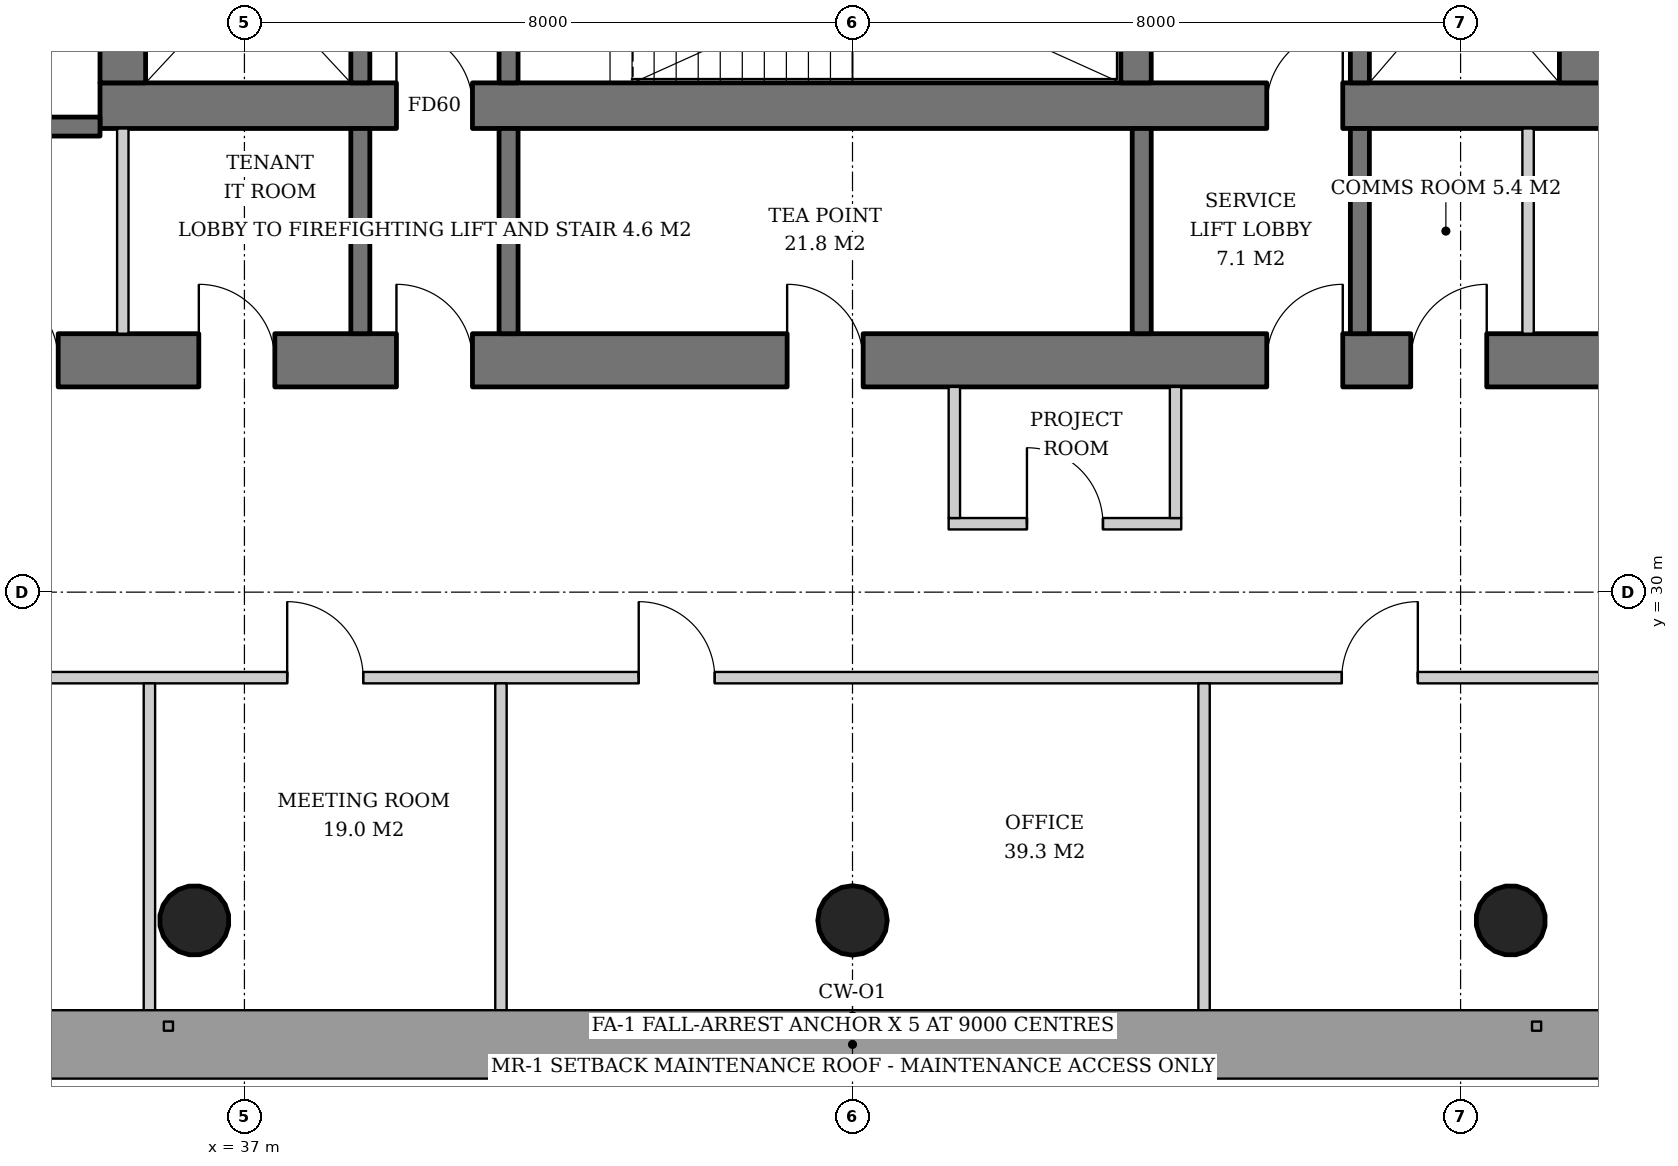
"""IFC4 building model, lengths in metres.
Left out: names, types, materials, properties, quantities, classifications, styles, units other than length and angle.
Written with IfcOpenShell. Run it as: python <this file> out.ifc"""

import sys

from ifc_helpers import new_model, si_unit, direction, frame, frame_2d, origin, origin_2d, place, context, subcontext, project, spatial, rectangle, hollow_circle, extrude, element, fill, save


model = new_model("IFC4")
c1 = context("Model", 3, precision=1e-05, world=origin(), true_north=direction((0.0, 1.0)))
c2 = subcontext(c1, "Body", "Model", "MODEL_VIEW")
j1 = project(units=[si_unit("LENGTHUNIT", "METRE"), si_unit("PLANEANGLEUNIT", "RADIAN")], contexts=[c1])
p1 = place(None, origin())
s1 = spatial("IfcSite", under=j1, at=p1, CompositionType="ELEMENT")
p2 = place(p1, origin())
s2 = spatial("IfcBuilding", under=s1, at=p2, CompositionType="ELEMENT")
p3 = place(p2, frame((0.0, 0.0, 135.0)))
s3 = spatial("IfcBuildingStorey", under=s2, at=p3, CompositionType="ELEMENT", Elevation=135.0)
p4 = place(p3, frame((36.322, 25.643, 0.0), z_axis=(0.015923015547, 0.031974442509, 0.999361842679), x_axis=(-0.895145027055, 0.445775033553, 0.0)))
e1 = element("IfcColumn", 1, at=p4, inside=s3, PredefinedType="COLUMN", context=c2, shape_type="SweptSolid", body=[
    extrude(hollow_circle(Radius=0.457, WallThickness=0.03, at=origin_2d()), origin(), (0.0, 0.0, 1.0), 3.802),
])
p5 = place(p3, frame((45.0, 25.643, 0.0), z_axis=(0.0, 0.031978496719, 0.999488557087), x_axis=(-1.0, 0.0, 0.0)))
e2 = element("IfcColumn", 2, at=p5, inside=s3, PredefinedType="COLUMN", context=c2, shape_type="SweptSolid", body=[
    extrude(hollow_circle(Radius=0.457, WallThickness=0.03, at=origin_2d()), origin(), (0.0, 0.0, 1.0), 3.802),
])
p6 = place(p3, frame((53.678, 25.643, 0.0), z_axis=(-0.015923015547, 0.031974442509, 0.999361842679), x_axis=(-0.895145027055, -0.445775033553, 0.0)))
e3 = element("IfcColumn", 3, at=p6, inside=s3, PredefinedType="COLUMN", context=c2, shape_type="SweptSolid", body=[
    extrude(hollow_circle(Radius=0.457, WallThickness=0.03, at=origin_2d()), origin(), (0.0, 0.0, 1.0), 3.802),
])
p7 = place(p3, frame((35.1, 36.4, 0.0), z_axis=(0.0, 0.0, 1.0), x_axis=(1.0, 0.0, 0.0)))
e4 = element("IfcWall", 4, at=p7, inside=s3, PredefinedType="SHEAR", context=c2, shape_type="SweptSolid", body=[
    extrude(rectangle(XDim=19.8, YDim=0.6, at=frame_2d((9.9, 0.0))), origin(), (0.0, 0.0, 1.0), 3.8),
])
p8 = place(p7, frame((3.9, 0.0, 0.0)))
e5 = element("IfcOpeningElement", 5, at=p8, cuts=e4, PredefinedType="OPENING", context=c2, shape_type="SweptSolid", body=[
    extrude(rectangle(XDim=1.0, YDim=2.1, at=frame_2d((0.5, 1.05))), frame((0.0, 0.31, 0.0), z_axis=(0.0, -1.0, 0.0), x_axis=(1.0, 0.0, 0.0)), (0.0, 0.0, 1.0), 0.62),
])
p9 = place(p7, frame((15.35, 0.0, 0.0)))
e6 = element("IfcOpeningElement", 6, at=p9, cuts=e4, PredefinedType="OPENING", context=c2, shape_type="SweptSolid", body=[
    extrude(rectangle(XDim=1.0, YDim=2.1, at=frame_2d((0.5, 1.05))), frame((0.0, 0.31, 0.0), z_axis=(0.0, -1.0, 0.0), x_axis=(1.0, 0.0, 0.0)), (0.0, 0.0, 1.0), 0.62),
])
p10 = place(p3, frame((35.4, 36.7, 0.0), z_axis=(0.0, 0.0, 1.0), x_axis=(0.0, 1.0, 0.0)))
e7 = element("IfcWall", 7, at=p10, inside=s3, PredefinedType="SHEAR", context=c2, shape_type="SweptSolid", body=[
    extrude(rectangle(XDim=18.6, YDim=0.6, at=frame_2d((9.3, 0.0))), origin(), (0.0, 0.0, 1.0), 3.8),
])
p11 = place(p10, frame((8.4, 0.0, 0.0)))
e8 = element("IfcOpeningElement", 8, at=p11, cuts=e7, PredefinedType="OPENING", context=c2, shape_type="SweptSolid", body=[
    extrude(rectangle(XDim=1.8, YDim=2.4, at=frame_2d((0.9, 1.2))), frame((0.0, 0.31, 0.0), z_axis=(0.0, -1.0, 0.0), x_axis=(1.0, 0.0, 0.0)), (0.0, 0.0, 1.0), 0.62),
])
p12 = place(p3, frame((54.6, 36.7, 0.0), z_axis=(0.0, 0.0, 1.0), x_axis=(0.0, 1.0, 0.0)))
e9 = element("IfcWall", 9, at=p12, inside=s3, PredefinedType="SHEAR", context=c2, shape_type="SweptSolid", body=[
    extrude(rectangle(XDim=18.6, YDim=0.6, at=frame_2d((9.3, 0.0))), origin(), (0.0, 0.0, 1.0), 3.8),
])
p13 = place(p12, frame((8.4, 0.0, 0.0)))
e10 = element("IfcOpeningElement", 10, at=p13, cuts=e9, PredefinedType="OPENING", context=c2, shape_type="SweptSolid", body=[
    extrude(rectangle(XDim=1.8, YDim=2.4, at=frame_2d((0.9, 1.2))), frame((0.0, 0.31, 0.0), z_axis=(0.0, -1.0, 0.0), x_axis=(1.0, 0.0, 0.0)), (0.0, 0.0, 1.0), 0.62),
])
p14 = place(p3, frame((31.7, 33.05, 0.0), z_axis=(0.0, 0.0, 1.0), x_axis=(1.0, 0.0, 0.0)))
e11 = element("IfcWall", 11, at=p14, inside=s3, PredefinedType="SHEAR", context=c2, shape_type="SweptSolid", body=[
    extrude(rectangle(XDim=26.6, YDim=0.7, at=frame_2d((13.3, 0.0))), origin(), (0.0, 0.0, 1.0), 3.8),
])
p15 = place(p14, frame((7.3, 0.0, 0.0)))
e12 = element("IfcOpeningElement", 12, at=p15, cuts=e11, PredefinedType="OPENING", context=c2, shape_type="SweptSolid", body=[
    extrude(rectangle(XDim=1.0, YDim=2.1, at=frame_2d((0.5, 1.05))), frame((0.0, 0.36, 0.0), z_axis=(0.0, -1.0, 0.0), x_axis=(1.0, 0.0, 0.0)), (0.0, 0.0, 1.0), 0.72),
])
p16 = place(p14, frame((18.75, 0.0, 0.0)))
e13 = element("IfcOpeningElement", 13, at=p16, cuts=e11, PredefinedType="OPENING", context=c2, shape_type="SweptSolid", body=[
    extrude(rectangle(XDim=1.0, YDim=2.1, at=frame_2d((0.5, 1.05))), frame((0.0, 0.36, 0.0), z_axis=(0.0, -1.0, 0.0), x_axis=(1.0, 0.0, 0.0)), (0.0, 0.0, 1.0), 0.72),
])
p17 = place(p14, frame((1.85, 0.0, 0.0)))
e14 = element("IfcOpeningElement", 14, at=p17, cuts=e11, PredefinedType="OPENING", context=c2, shape_type="SweptSolid", body=[
    extrude(rectangle(XDim=1.0, YDim=2.1, at=frame_2d((0.5, 1.05))), frame((0.0, 0.36, 0.0), z_axis=(0.0, -1.0, 0.0), x_axis=(1.0, 0.0, 0.0)), (0.0, 0.0, 1.0), 0.72),
])
p18 = place(p14, frame((4.7, 0.0, 0.0)))
e15 = element("IfcOpeningElement", 15, at=p18, cuts=e11, PredefinedType="OPENING", context=c2, shape_type="SweptSolid", body=[
    extrude(rectangle(XDim=1.0, YDim=2.1, at=frame_2d((0.5, 1.05))), frame((0.0, 0.36, 0.0), z_axis=(0.0, -1.0, 0.0), x_axis=(1.0, 0.0, 0.0)), (0.0, 0.0, 1.0), 0.72),
])
p19 = place(p14, frame((12.44, 0.0, 0.0)))
e16 = element("IfcOpeningElement", 16, at=p19, cuts=e11, PredefinedType="OPENING", context=c2, shape_type="SweptSolid", body=[
    extrude(rectangle(XDim=1.0, YDim=2.1, at=frame_2d((0.5, 1.05))), frame((0.0, 0.36, 0.0), z_axis=(0.0, -1.0, 0.0), x_axis=(1.0, 0.0, 0.0)), (0.0, 0.0, 1.0), 0.72),
])
p20 = place(p14, frame((20.644, 0.0, 0.0)))
e17 = element("IfcOpeningElement", 17, at=p20, cuts=e11, PredefinedType="OPENING", context=c2, shape_type="SweptSolid", body=[
    extrude(rectangle(XDim=1.0, YDim=2.1, at=frame_2d((0.5, 1.05))), frame((0.0, 0.36, 0.0), z_axis=(0.0, -1.0, 0.0), x_axis=(1.0, 0.0, 0.0)), (0.0, 0.0, 1.0), 0.72),
])
p21 = place(p14, frame((23.544, 0.0, 0.0)))
e18 = element("IfcOpeningElement", 18, at=p21, cuts=e11, PredefinedType="OPENING", context=c2, shape_type="SweptSolid", body=[
    extrude(rectangle(XDim=1.0, YDim=2.1, at=frame_2d((0.5, 1.05))), frame((0.0, 0.36, 0.0), z_axis=(0.0, -1.0, 0.0), x_axis=(1.0, 0.0, 0.0)), (0.0, 0.0, 1.0), 0.72),
])
p22 = place(p3, frame((48.73, 36.7, 0.0), z_axis=(0.0, 0.0, 1.0), x_axis=(0.0, 1.0, 0.0)))
e19 = element("IfcWall", 19, at=p22, inside=s3, PredefinedType="SHEAR", context=c2, shape_type="SweptSolid", body=[
    extrude(rectangle(XDim=2.9, YDim=0.4, at=frame_2d((1.45, 0.0))), origin(), (0.0, 0.0, 1.0), 3.8),
])
p23 = place(p3, frame((38.525, 36.7, 0.0), z_axis=(0.0, 0.0, 1.0), x_axis=(0.0, 1.0, 0.0)))
e20 = element("IfcWall", 20, at=p23, inside=s3, PredefinedType="SHEAR", context=c2, shape_type="SweptSolid", body=[
    extrude(rectangle(XDim=2.9, YDim=0.25, at=frame_2d((1.45, 0.0))), origin(), (0.0, 0.0, 1.0), 3.8),
])
p24 = place(p23, frame((0.8, 0.0, 0.0)))
e21 = element("IfcOpeningElement", 21, at=p24, cuts=e20, PredefinedType="OPENING", context=c2, shape_type="SweptSolid", body=[
    extrude(rectangle(XDim=1.3, YDim=2.2, at=frame_2d((0.65, 1.1))), frame((0.0, 0.135, 0.0), z_axis=(0.0, -1.0, 0.0), x_axis=(1.0, 0.0, 0.0)), (0.0, 0.0, 1.0), 0.27),
])
p25 = place(p3, frame((40.475, 36.7, 0.0), z_axis=(0.0, 0.0, 1.0), x_axis=(0.0, 1.0, 0.0)))
e22 = element("IfcWall", 22, at=p25, inside=s3, PredefinedType="SHEAR", context=c2, shape_type="SweptSolid", body=[
    extrude(rectangle(XDim=2.9, YDim=0.25, at=frame_2d((1.45, 0.0))), origin(), (0.0, 0.0, 1.0), 3.8),
])
p26 = place(p25, frame((0.75, 0.0, 0.0)))
e23 = element("IfcOpeningElement", 23, at=p26, cuts=e22, PredefinedType="OPENING", context=c2, shape_type="SweptSolid", body=[
    extrude(rectangle(XDim=1.2, YDim=2.1, at=frame_2d((0.6, 1.05))), frame((0.0, 0.135, 0.0), z_axis=(0.0, -1.0, 0.0), x_axis=(1.0, 0.0, 0.0)), (0.0, 0.0, 1.0), 0.27),
])
p27 = place(p3, frame((51.675, 36.7, 0.0), z_axis=(0.0, 0.0, 1.0), x_axis=(0.0, 1.0, 0.0)))
e24 = element("IfcWall", 24, at=p27, inside=s3, PredefinedType="SHEAR", context=c2, shape_type="SweptSolid", body=[
    extrude(rectangle(XDim=2.9, YDim=0.25, at=frame_2d((1.45, 0.0))), origin(), (0.0, 0.0, 1.0), 3.8),
])
p28 = place(p27, frame((0.75, 0.0, 0.0)))
e25 = element("IfcOpeningElement", 25, at=p28, cuts=e24, PredefinedType="OPENING", context=c2, shape_type="SweptSolid", body=[
    extrude(rectangle(XDim=1.4, YDim=2.4, at=frame_2d((0.7, 1.2))), frame((0.0, 0.135, 0.0), z_axis=(0.0, -1.0, 0.0), x_axis=(1.0, 0.0, 0.0)), (0.0, 0.0, 1.0), 0.27),
])
p29 = place(p3, frame((32.4, 36.125, 0.0), z_axis=(0.0, 0.0, 1.0), x_axis=(1.0, 0.0, 0.0)))
e26 = element("IfcWall", 26, at=p29, inside=s3, PredefinedType="SHEAR", context=c2, shape_type="SweptSolid", body=[
    extrude(rectangle(XDim=2.7, YDim=0.25, at=frame_2d((1.35, 0.0))), origin(), (0.0, 0.0, 1.0), 3.8),
])
for number, where, z_axis, x_axis in (
    (27, (38.525, 33.4, 0.0), (0.0, 0.0, 1.0), (0.0, 1.0, 0.0)),
    (28, (40.475, 33.4, 0.0), (0.0, 0.0, 1.0), (0.0, 1.0, 0.0)),
    (29, (48.805, 33.4, 0.0), (0.0, 0.0, 1.0), (0.0, 1.0, 0.0)),
    (30, (51.675, 33.4, 0.0), (0.0, 0.0, 1.0), (0.0, 1.0, 0.0)),
):
    element("IfcWall", number, at=place(p3, frame(where, z_axis=z_axis, x_axis=x_axis)), inside=s3, PredefinedType="SOLIDWALL", context=c2, shape_type="SweptSolid", body=[
        extrude(rectangle(XDim=2.7, YDim=0.25, at=frame_2d((1.35, 0.0))), origin(), (0.0, 0.0, 1.0), 3.62),
    ])
for number, where, z_axis, x_axis in (
    (31, (35.4, 33.4, 0.0), (0.0, 0.0, 1.0), (0.0, 1.0, 0.0)),
    (32, (53.888, 33.4, 0.0), (0.0, 0.0, 1.0), (0.0, 1.0, 0.0)),
):
    element("IfcWall", number, at=place(p3, frame(where, z_axis=z_axis, x_axis=x_axis)), inside=s3, PredefinedType="SOLIDWALL", context=c2, shape_type="SweptSolid", body=[
        extrude(rectangle(XDim=2.7, YDim=0.15, at=frame_2d((1.35, 0.0))), origin(), (0.0, 0.0, 1.0), 3.62),
    ])
p30 = place(p3, frame((46.265, 30.9, 0.0), z_axis=(0.0, 0.0, 1.0), x_axis=(1.0, 0.0, 0.0)))
e33 = element("IfcWall", 33, at=p30, inside=s3, PredefinedType="PARTITIONING", context=c2, shape_type="SweptSolid", body=[
    extrude(rectangle(XDim=3.06, YDim=0.15, at=frame_2d((1.53, 0.0))), origin(), (0.0, 0.0, 1.0), 2.858),
])
p31 = place(p30, frame((1.03, 0.0, 0.0)))
e34 = element("IfcOpeningElement", 34, at=p31, cuts=e33, PredefinedType="OPENING", context=c2, shape_type="SweptSolid", body=[
    extrude(rectangle(XDim=1.0, YDim=2.1, at=frame_2d((0.5, 1.05))), frame((0.0, 0.085, 0.0), z_axis=(0.0, -1.0, 0.0), x_axis=(1.0, 0.0, 0.0)), (0.0, 0.0, 1.0), 0.17),
])
for number, where, z_axis, x_axis in (
    (35, (46.34, 32.7, 0.0), (0.0, 0.0, 1.0), (0.0, -1.0, 0.0)),
    (36, (49.25, 32.7, 0.0), (0.0, 0.0, 1.0), (0.0, -1.0, 0.0)),
):
    element("IfcWall", number, at=place(p3, frame(where, z_axis=z_axis, x_axis=x_axis)), inside=s3, PredefinedType="PARTITIONING", context=c2, shape_type="SweptSolid", body=[
        extrude(rectangle(XDim=1.725, YDim=0.15, at=frame_2d((0.862, 0.0))), origin(), (0.0, 0.0, 1.0), 3.62),
    ])
p32 = place(p3, frame((29.789, 28.875, 0.0), z_axis=(0.0, 0.0, 1.0), x_axis=(1.0, 0.0, 0.0)))
e37 = element("IfcWall", 37, at=p32, inside=s3, PredefinedType="PARTITIONING", context=c2, shape_type="SweptSolid", body=[
    extrude(rectangle(XDim=30.423, YDim=0.15, at=frame_2d((15.211, 0.0))), origin(), (0.0, 0.0, 1.0), 2.72),
])
p33 = place(p32, frame((3.149, 0.0, 0.0)))
e38 = element("IfcOpeningElement", 38, at=p33, cuts=e37, PredefinedType="OPENING", context=c2, shape_type="SweptSolid", body=[
    extrude(rectangle(XDim=1.0, YDim=2.1, at=frame_2d((0.5, 1.05))), frame((0.0, 0.085, 0.0), z_axis=(0.0, -1.0, 0.0), x_axis=(1.0, 0.0, 0.0)), (0.0, 0.0, 1.0), 0.17),
])
p34 = place(p32, frame((7.774, 0.0, 0.0)))
e39 = element("IfcOpeningElement", 39, at=p34, cuts=e37, PredefinedType="OPENING", context=c2, shape_type="SweptSolid", body=[
    extrude(rectangle(XDim=1.0, YDim=2.1, at=frame_2d((0.5, 1.05))), frame((0.0, 0.085, 0.0), z_axis=(0.0, -1.0, 0.0), x_axis=(1.0, 0.0, 0.0)), (0.0, 0.0, 1.0), 0.17),
])
p35 = place(p32, frame((12.399, 0.0, 0.0)))
e40 = element("IfcOpeningElement", 40, at=p35, cuts=e37, PredefinedType="OPENING", context=c2, shape_type="SweptSolid", body=[
    extrude(rectangle(XDim=1.0, YDim=2.1, at=frame_2d((0.5, 1.05))), frame((0.0, 0.085, 0.0), z_axis=(0.0, -1.0, 0.0), x_axis=(1.0, 0.0, 0.0)), (0.0, 0.0, 1.0), 0.17),
])
p36 = place(p32, frame((21.649, 0.0, 0.0)))
e41 = element("IfcOpeningElement", 41, at=p36, cuts=e37, PredefinedType="OPENING", context=c2, shape_type="SweptSolid", body=[
    extrude(rectangle(XDim=1.0, YDim=2.1, at=frame_2d((0.5, 1.05))), frame((0.0, 0.085, 0.0), z_axis=(0.0, -1.0, 0.0), x_axis=(1.0, 0.0, 0.0)), (0.0, 0.0, 1.0), 0.17),
])
for number, where, z_axis, x_axis in (
    (42, (35.75, 28.8, 0.0), (0.0, 0.0, 1.0), (0.0, -1.0, 0.0)),
    (43, (40.375, 28.8, 0.0), (0.0, 0.0, 1.0), (0.0, -1.0, 0.0)),
    (44, (49.625, 28.8, 0.0), (0.0, 0.0, 1.0), (0.0, -1.0, 0.0)),
):
    element("IfcWall", number, at=place(p3, frame(where, z_axis=z_axis, x_axis=x_axis)), inside=s3, PredefinedType="PARTITIONING", context=c2, shape_type="SweptSolid", body=[
        extrude(rectangle(XDim=4.34, YDim=0.15, at=frame_2d((2.17, 0.0))), origin(), (0.0, 0.0, 1.0), 2.82),
    ])
p37 = place(p8, origin())
e45 = element("IfcDoor", 45, at=p37, inside=s3, OperationType="SINGLE_SWING_LEFT", PredefinedType="DOOR", context=c2, shape_type="SweptSolid", body=[
    extrude(rectangle(XDim=1.0, YDim=2.1, at=frame_2d((0.5, 1.05))), frame((0.0, 0.025, 0.0), z_axis=(0.0, -1.0, 0.0), x_axis=(1.0, 0.0, 0.0)), (0.0, 0.0, 1.0), 0.05),
])
fill(e5, e45)
p38 = place(p9, origin())
e46 = element("IfcDoor", 46, at=p38, inside=s3, OperationType="SINGLE_SWING_RIGHT", PredefinedType="DOOR", context=c2, shape_type="SweptSolid", body=[
    extrude(rectangle(XDim=1.0, YDim=2.1, at=frame_2d((0.5, 1.05))), frame((0.0, 0.025, 0.0), z_axis=(0.0, -1.0, 0.0), x_axis=(1.0, 0.0, 0.0)), (0.0, 0.0, 1.0), 0.05),
])
fill(e6, e46)
p39 = place(p15, origin())
e47 = element("IfcDoor", 47, at=p39, inside=s3, OperationType="SINGLE_SWING_LEFT", PredefinedType="DOOR", context=c2, shape_type="SweptSolid", body=[
    extrude(rectangle(XDim=1.0, YDim=2.1, at=frame_2d((0.5, 1.05))), frame((0.0, 0.025, 0.0), z_axis=(0.0, -1.0, 0.0), x_axis=(1.0, 0.0, 0.0)), (0.0, 0.0, 1.0), 0.05),
])
fill(e12, e47)
p40 = place(p16, origin())
e48 = element("IfcDoor", 48, at=p40, inside=s3, OperationType="SINGLE_SWING_RIGHT", PredefinedType="DOOR", context=c2, shape_type="SweptSolid", body=[
    extrude(rectangle(XDim=1.0, YDim=2.1, at=frame_2d((0.5, 1.05))), frame((0.0, 0.025, 0.0), z_axis=(0.0, -1.0, 0.0), x_axis=(1.0, 0.0, 0.0)), (0.0, 0.0, 1.0), 0.05),
])
fill(e13, e48)
p41 = place(p17, origin())
e49 = element("IfcDoor", 49, at=p41, inside=s3, OperationType="SINGLE_SWING_LEFT", PredefinedType="DOOR", context=c2, shape_type="SweptSolid", body=[
    extrude(rectangle(XDim=1.0, YDim=2.1, at=frame_2d((0.5, 1.05))), frame((0.0, 0.34, 0.0), z_axis=(0.0, -1.0, 0.0), x_axis=(1.0, 0.0, 0.0)), (0.0, 0.0, 1.0), 0.05),
])
fill(e14, e49)
p42 = place(p18, origin())
e50 = element("IfcDoor", 50, at=p42, inside=s3, OperationType="SINGLE_SWING_LEFT", PredefinedType="DOOR", context=c2, shape_type="SweptSolid", body=[
    extrude(rectangle(XDim=1.0, YDim=2.1, at=frame_2d((0.5, 1.05))), frame((0.0, 0.34, 0.0), z_axis=(0.0, -1.0, 0.0), x_axis=(1.0, 0.0, 0.0)), (0.0, 0.0, 1.0), 0.05),
])
fill(e15, e50)
p43 = place(p19, origin())
e51 = element("IfcDoor", 51, at=p43, inside=s3, OperationType="SINGLE_SWING_LEFT", PredefinedType="DOOR", context=c2, shape_type="SweptSolid", body=[
    extrude(rectangle(XDim=1.0, YDim=2.1, at=frame_2d((0.5, 1.05))), frame((0.0, 0.34, 0.0), z_axis=(0.0, -1.0, 0.0), x_axis=(1.0, 0.0, 0.0)), (0.0, 0.0, 1.0), 0.05),
])
fill(e16, e51)
p44 = place(p20, origin())
e52 = element("IfcDoor", 52, at=p44, inside=s3, OperationType="SINGLE_SWING_RIGHT", PredefinedType="DOOR", context=c2, shape_type="SweptSolid", body=[
    extrude(rectangle(XDim=1.0, YDim=2.1, at=frame_2d((0.5, 1.05))), frame((0.0, 0.34, 0.0), z_axis=(0.0, -1.0, 0.0), x_axis=(1.0, 0.0, 0.0)), (0.0, 0.0, 1.0), 0.05),
])
fill(e17, e52)
p45 = place(p31, origin())
e53 = element("IfcDoor", 53, at=p45, inside=s3, OperationType="SINGLE_SWING_LEFT", PredefinedType="DOOR", context=c2, shape_type="SweptSolid", body=[
    extrude(rectangle(XDim=1.0, YDim=2.1, at=frame_2d((0.5, 1.05))), frame((0.0, 0.025, 0.0), z_axis=(0.0, -1.0, 0.0), x_axis=(1.0, 0.0, 0.0)), (0.0, 0.0, 1.0), 0.05),
])
fill(e34, e53)
p46 = place(p34, origin())
e54 = element("IfcDoor", 54, at=p46, inside=s3, OperationType="SINGLE_SWING_LEFT", PredefinedType="DOOR", context=c2, shape_type="SweptSolid", body=[
    extrude(rectangle(XDim=1.0, YDim=2.1, at=frame_2d((0.5, 1.05))), frame((0.0, 0.025, 0.0), z_axis=(0.0, -1.0, 0.0), x_axis=(1.0, 0.0, 0.0)), (0.0, 0.0, 1.0), 0.05),
])
fill(e39, e54)
p47 = place(p35, origin())
e55 = element("IfcDoor", 55, at=p47, inside=s3, OperationType="SINGLE_SWING_LEFT", PredefinedType="DOOR", context=c2, shape_type="SweptSolid", body=[
    extrude(rectangle(XDim=1.0, YDim=2.1, at=frame_2d((0.5, 1.05))), frame((0.0, 0.025, 0.0), z_axis=(0.0, -1.0, 0.0), x_axis=(1.0, 0.0, 0.0)), (0.0, 0.0, 1.0), 0.05),
])
fill(e40, e55)
p48 = place(p36, origin())
e56 = element("IfcDoor", 56, at=p48, inside=s3, OperationType="SINGLE_SWING_RIGHT", PredefinedType="DOOR", context=c2, shape_type="SweptSolid", body=[
    extrude(rectangle(XDim=1.0, YDim=2.1, at=frame_2d((0.5, 1.05))), frame((0.0, 0.025, 0.0), z_axis=(0.0, -1.0, 0.0), x_axis=(1.0, 0.0, 0.0)), (0.0, 0.0, 1.0), 0.05),
])
fill(e41, e56)
save(model, sys.argv[1])
